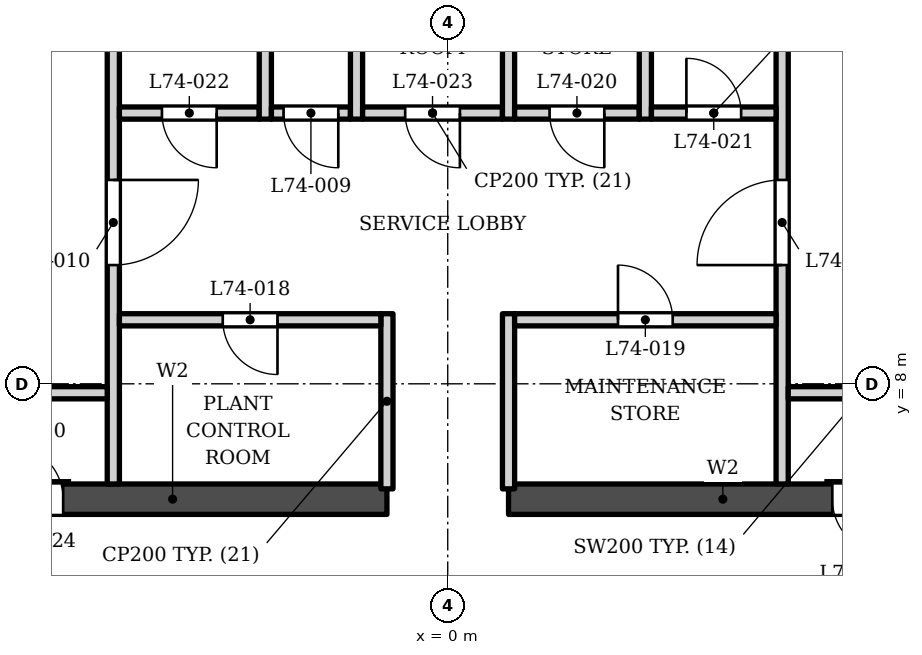
"""IFC4 building model, lengths in metres.
Left out: names, types, materials, properties, quantities, classifications, styles, units other than length and angle.
Written with IfcOpenShell. Run it as: python <this file> out.ifc"""

import sys

from ifc_helpers import new_model, si_unit, direction, frame, frame_2d, origin, place, context, subcontext, project, spatial, rectangle, extrude, element, fill, save


model = new_model("IFC4")
c1 = context("Model", 3, precision=1e-05, world=origin(), true_north=direction((0.0, 1.0)))
c2 = subcontext(c1, "Body", "Model", "MODEL_VIEW")
j1 = project(units=[si_unit("LENGTHUNIT", "METRE"), si_unit("PLANEANGLEUNIT", "RADIAN")], contexts=[c1])
p1 = place(None, origin())
s1 = spatial("IfcSite", under=j1, at=p1, CompositionType="ELEMENT")
p2 = place(p1, origin())
s2 = spatial("IfcBuilding", under=s1, at=p2, CompositionType="ELEMENT")
p3 = place(p2, frame((0.0, 0.0, 315.5)))
s3 = spatial("IfcBuildingStorey", under=s2, at=p3, CompositionType="ELEMENT", Elevation=315.5)
p4 = place(p3, frame((-8.05, 6.103, 0.0), z_axis=(0.0, 0.0, 1.0), x_axis=(1.0, 0.0, 0.0)))
e1 = element("IfcWall", 1, at=p4, inside=s3, PredefinedType="SHEAR", context=c2, shape_type="SweptSolid", body=[
    extrude(rectangle(XDim=7.05, YDim=0.5, at=frame_2d((3.525, 0.0))), origin(), (0.0, 0.0, 1.0), 5.0),
])
p5 = place(p4, frame((0.825, 0.0, 0.0)))
e2 = element("IfcOpeningElement", 2, at=p5, cuts=e1, PredefinedType="OPENING", context=c2, shape_type="SweptSolid", body=[
    extrude(rectangle(XDim=0.9, YDim=2.1, at=frame_2d((0.45, 1.05))), frame((0.0, 0.26, 0.0), z_axis=(0.0, -1.0, 0.0), x_axis=(1.0, 0.0, 0.0)), (0.0, 0.0, 1.0), 0.52),
])
p6 = place(p3, frame((1.0, 6.103, 0.0), z_axis=(0.0, 0.0, 1.0), x_axis=(1.0, 0.0, 0.0)))
e3 = element("IfcWall", 3, at=p6, inside=s3, PredefinedType="SHEAR", context=c2, shape_type="SweptSolid", body=[
    extrude(rectangle(XDim=7.05, YDim=0.5, at=frame_2d((3.525, 0.0))), origin(), (0.0, 0.0, 1.0), 5.0),
])
p7 = place(p6, frame((5.325, 0.0, 0.0)))
e4 = element("IfcOpeningElement", 4, at=p7, cuts=e3, PredefinedType="OPENING", context=c2, shape_type="SweptSolid", body=[
    extrude(rectangle(XDim=0.9, YDim=2.1, at=frame_2d((0.45, 1.05))), frame((0.0, 0.26, 0.0), z_axis=(0.0, -1.0, 0.0), x_axis=(1.0, 0.0, 0.0)), (0.0, 0.0, 1.0), 0.52),
])
for number, where, z_axis, x_axis in (
    (5, (-1.0, 6.273, 0.0), (0.0, 0.0, 1.0), (0.0, 1.0, 0.0)),
    (6, (1.0, 6.273, 0.0), (0.0, 0.0, 1.0), (0.0, 1.0, 0.0)),
):
    element("IfcWall", number, at=place(p3, frame(where, z_axis=z_axis, x_axis=x_axis)), inside=s3, PredefinedType="PARTITIONING", context=c2, shape_type="SweptSolid", body=[
        extrude(rectangle(XDim=2.88, YDim=0.2, at=frame_2d((1.44, 0.0))), origin(), (0.0, 0.0, 1.0), 4.8),
    ])
p8 = place(p3, frame((-5.5, 6.353, 0.0), z_axis=(0.0, 0.0, 1.0), x_axis=(0.0, 1.0, 0.0)))
e7 = element("IfcWall", 7, at=p8, inside=s3, PredefinedType="SOLIDWALL", context=c2, shape_type="SweptSolid", body=[
    extrude(rectangle(XDim=7.85, YDim=0.2, at=frame_2d((3.925, 0.0))), origin(), (0.0, 0.0, 1.0), 4.8),
])
p9 = place(p8, frame((3.6, 0.0, 0.0)))
e8 = element("IfcOpeningElement", 8, at=p9, cuts=e7, PredefinedType="OPENING", context=c2, shape_type="SweptSolid", body=[
    extrude(rectangle(XDim=1.4, YDim=2.1, at=frame_2d((0.7, 1.05))), frame((0.0, 0.11, 0.0), z_axis=(0.0, -1.0, 0.0), x_axis=(1.0, 0.0, 0.0)), (0.0, 0.0, 1.0), 0.22),
])
p10 = place(p3, frame((5.5, 6.353, 0.0), z_axis=(0.0, 0.0, 1.0), x_axis=(0.0, 1.0, 0.0)))
e9 = element("IfcWall", 9, at=p10, inside=s3, PredefinedType="SOLIDWALL", context=c2, shape_type="SweptSolid", body=[
    extrude(rectangle(XDim=7.85, YDim=0.2, at=frame_2d((3.925, 0.0))), origin(), (0.0, 0.0, 1.0), 4.8),
])
p11 = place(p10, frame((3.6, 0.0, 0.0)))
e10 = element("IfcOpeningElement", 10, at=p11, cuts=e9, PredefinedType="OPENING", context=c2, shape_type="SweptSolid", body=[
    extrude(rectangle(XDim=1.4, YDim=2.1, at=frame_2d((0.7, 1.05))), frame((0.0, 0.11, 0.0), z_axis=(0.0, -1.0, 0.0), x_axis=(1.0, 0.0, 0.0)), (0.0, 0.0, 1.0), 0.22),
])
for number, where, z_axis, x_axis in (
    (11, (-8.05, 7.853, 0.0), (0.0, 0.0, 1.0), (1.0, 0.0, 0.0)),
    (12, (5.6, 7.853, 0.0), (0.0, 0.0, 1.0), (1.0, 0.0, 0.0)),
):
    element("IfcWall", number, at=place(p3, frame(where, z_axis=z_axis, x_axis=x_axis)), inside=s3, PredefinedType="SOLIDWALL", context=c2, shape_type="SweptSolid", body=[
        extrude(rectangle(XDim=2.45, YDim=0.2, at=frame_2d((1.225, 0.0))), origin(), (0.0, 0.0, 1.0), 4.8),
    ])
p12 = place(p3, frame((-5.4, 9.052, 0.0), z_axis=(0.0, 0.0, 1.0), x_axis=(1.0, 0.0, 0.0)))
e13 = element("IfcWall", 13, at=p12, inside=s3, PredefinedType="PARTITIONING", context=c2, shape_type="SweptSolid", body=[
    extrude(rectangle(XDim=4.3, YDim=0.2, at=frame_2d((2.15, 0.0))), origin(), (0.0, 0.0, 1.0), 4.8),
])
p13 = place(p12, frame((1.7, 0.0, 0.0)))
e14 = element("IfcOpeningElement", 14, at=p13, cuts=e13, PredefinedType="OPENING", context=c2, shape_type="SweptSolid", body=[
    extrude(rectangle(XDim=0.9, YDim=2.1, at=frame_2d((0.45, 1.05))), frame((0.0, 0.11, 0.0), z_axis=(0.0, -1.0, 0.0), x_axis=(1.0, 0.0, 0.0)), (0.0, 0.0, 1.0), 0.22),
])
p14 = place(p3, frame((1.1, 9.052, 0.0), z_axis=(0.0, 0.0, 1.0), x_axis=(1.0, 0.0, 0.0)))
e15 = element("IfcWall", 15, at=p14, inside=s3, PredefinedType="PARTITIONING", context=c2, shape_type="SweptSolid", body=[
    extrude(rectangle(XDim=4.3, YDim=0.2, at=frame_2d((2.15, 0.0))), origin(), (0.0, 0.0, 1.0), 4.8),
])
p15 = place(p14, frame((1.7, 0.0, 0.0)))
e16 = element("IfcOpeningElement", 16, at=p15, cuts=e15, PredefinedType="OPENING", context=c2, shape_type="SweptSolid", body=[
    extrude(rectangle(XDim=0.9, YDim=2.1, at=frame_2d((0.45, 1.05))), frame((0.0, 0.11, 0.0), z_axis=(0.0, -1.0, 0.0), x_axis=(1.0, 0.0, 0.0)), (0.0, 0.0, 1.0), 0.22),
])
p16 = place(p3, frame((-5.4, 12.453, 0.0), z_axis=(0.0, 0.0, 1.0), x_axis=(1.0, 0.0, 0.0)))
e17 = element("IfcWall", 17, at=p16, inside=s3, PredefinedType="PARTITIONING", context=c2, shape_type="SweptSolid", body=[
    extrude(rectangle(XDim=2.3, YDim=0.2, at=frame_2d((1.15, 0.0))), origin(), (0.0, 0.0, 1.0), 4.8),
])
p17 = place(p16, frame((0.7, 0.0, 0.0)))
e18 = element("IfcOpeningElement", 18, at=p17, cuts=e17, PredefinedType="OPENING", context=c2, shape_type="SweptSolid", body=[
    extrude(rectangle(XDim=0.9, YDim=2.1, at=frame_2d((0.45, 1.05))), frame((0.0, 0.11, 0.0), z_axis=(0.0, -1.0, 0.0), x_axis=(1.0, 0.0, 0.0)), (0.0, 0.0, 1.0), 0.22),
])
p18 = place(p3, frame((-3.0, 12.353, 0.0), z_axis=(0.0, 0.0, 1.0), x_axis=(0.0, 1.0, 0.0)))
e19 = element("IfcWall", 19, at=p18, inside=s3, PredefinedType="PARTITIONING", context=c2, shape_type="SweptSolid", body=[
    extrude(rectangle(XDim=3.2, YDim=0.2, at=frame_2d((1.6, 0.0))), origin(), (0.0, 0.0, 1.0), 4.8),
])
p19 = place(p3, frame((-2.9, 12.453, 0.0), z_axis=(0.0, 0.0, 1.0), x_axis=(1.0, 0.0, 0.0)))
e20 = element("IfcWall", 20, at=p19, inside=s3, PredefinedType="PARTITIONING", context=c2, shape_type="SweptSolid", body=[
    extrude(rectangle(XDim=1.3, YDim=0.2, at=frame_2d((0.65, 0.0))), origin(), (0.0, 0.0, 1.0), 4.8),
])
p20 = place(p19, frame((0.2, 0.0, 0.0)))
e21 = element("IfcOpeningElement", 21, at=p20, cuts=e20, PredefinedType="OPENING", context=c2, shape_type="SweptSolid", body=[
    extrude(rectangle(XDim=0.9, YDim=2.1, at=frame_2d((0.45, 1.05))), frame((0.0, 0.11, 0.0), z_axis=(0.0, -1.0, 0.0), x_axis=(1.0, 0.0, 0.0)), (0.0, 0.0, 1.0), 0.22),
])
p21 = place(p3, frame((-1.5, 12.353, 0.0), z_axis=(0.0, 0.0, 1.0), x_axis=(0.0, 1.0, 0.0)))
e22 = element("IfcWall", 22, at=p21, inside=s3, PredefinedType="PARTITIONING", context=c2, shape_type="SweptSolid", body=[
    extrude(rectangle(XDim=3.2, YDim=0.2, at=frame_2d((1.6, 0.0))), origin(), (0.0, 0.0, 1.0), 4.8),
])
p22 = place(p3, frame((-1.4, 12.453, 0.0), z_axis=(0.0, 0.0, 1.0), x_axis=(1.0, 0.0, 0.0)))
e23 = element("IfcWall", 23, at=p22, inside=s3, PredefinedType="PARTITIONING", context=c2, shape_type="SweptSolid", body=[
    extrude(rectangle(XDim=2.3, YDim=0.2, at=frame_2d((1.15, 0.0))), origin(), (0.0, 0.0, 1.0), 4.8),
])
p23 = place(p22, frame((0.7, 0.0, 0.0)))
e24 = element("IfcOpeningElement", 24, at=p23, cuts=e23, PredefinedType="OPENING", context=c2, shape_type="SweptSolid", body=[
    extrude(rectangle(XDim=0.9, YDim=2.1, at=frame_2d((0.45, 1.05))), frame((0.0, 0.11, 0.0), z_axis=(0.0, -1.0, 0.0), x_axis=(1.0, 0.0, 0.0)), (0.0, 0.0, 1.0), 0.22),
])
p24 = place(p3, frame((1.0, 12.353, 0.0), z_axis=(0.0, 0.0, 1.0), x_axis=(0.0, 1.0, 0.0)))
e25 = element("IfcWall", 25, at=p24, inside=s3, PredefinedType="PARTITIONING", context=c2, shape_type="SweptSolid", body=[
    extrude(rectangle(XDim=3.2, YDim=0.2, at=frame_2d((1.6, 0.0))), origin(), (0.0, 0.0, 1.0), 4.8),
])
p25 = place(p3, frame((1.1, 12.453, 0.0), z_axis=(0.0, 0.0, 1.0), x_axis=(1.0, 0.0, 0.0)))
e26 = element("IfcWall", 26, at=p25, inside=s3, PredefinedType="PARTITIONING", context=c2, shape_type="SweptSolid", body=[
    extrude(rectangle(XDim=2.05, YDim=0.2, at=frame_2d((1.025, 0.0))), origin(), (0.0, 0.0, 1.0), 4.8),
])
p26 = place(p25, frame((0.575, 0.0, 0.0)))
e27 = element("IfcOpeningElement", 27, at=p26, cuts=e26, PredefinedType="OPENING", context=c2, shape_type="SweptSolid", body=[
    extrude(rectangle(XDim=0.9, YDim=2.1, at=frame_2d((0.45, 1.05))), frame((0.0, 0.11, 0.0), z_axis=(0.0, -1.0, 0.0), x_axis=(1.0, 0.0, 0.0)), (0.0, 0.0, 1.0), 0.22),
])
p27 = place(p3, frame((3.25, 12.353, 0.0), z_axis=(0.0, 0.0, 1.0), x_axis=(0.0, 1.0, 0.0)))
e28 = element("IfcWall", 28, at=p27, inside=s3, PredefinedType="PARTITIONING", context=c2, shape_type="SweptSolid", body=[
    extrude(rectangle(XDim=3.2, YDim=0.2, at=frame_2d((1.6, 0.0))), origin(), (0.0, 0.0, 1.0), 4.8),
])
p28 = place(p3, frame((3.35, 12.453, 0.0), z_axis=(0.0, 0.0, 1.0), x_axis=(1.0, 0.0, 0.0)))
e29 = element("IfcWall", 29, at=p28, inside=s3, PredefinedType="PARTITIONING", context=c2, shape_type="SweptSolid", body=[
    extrude(rectangle(XDim=2.05, YDim=0.2, at=frame_2d((1.025, 0.0))), origin(), (0.0, 0.0, 1.0), 4.8),
])
p29 = place(p28, frame((0.575, 0.0, 0.0)))
e30 = element("IfcOpeningElement", 30, at=p29, cuts=e29, PredefinedType="OPENING", context=c2, shape_type="SweptSolid", body=[
    extrude(rectangle(XDim=0.9, YDim=2.1, at=frame_2d((0.45, 1.05))), frame((0.0, 0.11, 0.0), z_axis=(0.0, -1.0, 0.0), x_axis=(1.0, 0.0, 0.0)), (0.0, 0.0, 1.0), 0.22),
])
p30 = place(p20, origin())
e31 = element("IfcDoor", 31, at=p30, inside=s3, OperationType="SINGLE_SWING_RIGHT", PredefinedType="DOOR", context=c2, shape_type="SweptSolid", body=[
    extrude(rectangle(XDim=0.9, YDim=2.1, at=frame_2d((0.45, 1.05))), frame((0.0, 0.025, 0.0), z_axis=(0.0, -1.0, 0.0), x_axis=(1.0, 0.0, 0.0)), (0.0, 0.0, 1.0), 0.05),
])
fill(e21, e31)
p31 = place(p9, origin())
e32 = element("IfcDoor", 32, at=p31, inside=s3, OperationType="SINGLE_SWING_RIGHT", PredefinedType="DOOR", context=c2, shape_type="SweptSolid", body=[
    extrude(rectangle(XDim=1.4, YDim=2.1, at=frame_2d((0.7, 1.05))), frame((0.0, 0.025, 0.0), z_axis=(0.0, -1.0, 0.0), x_axis=(1.0, 0.0, 0.0)), (0.0, 0.0, 1.0), 0.05),
])
fill(e8, e32)
p32 = place(p11, origin())
e33 = element("IfcDoor", 33, at=p32, inside=s3, OperationType="SINGLE_SWING_LEFT", PredefinedType="DOOR", context=c2, shape_type="SweptSolid", body=[
    extrude(rectangle(XDim=1.4, YDim=2.1, at=frame_2d((0.7, 1.05))), frame((0.0, 0.025, 0.0), z_axis=(0.0, -1.0, 0.0), x_axis=(1.0, 0.0, 0.0)), (0.0, 0.0, 1.0), 0.05),
])
fill(e10, e33)
p33 = place(p13, origin())
e34 = element("IfcDoor", 34, at=p33, inside=s3, OperationType="SINGLE_SWING_RIGHT", PredefinedType="DOOR", context=c2, shape_type="SweptSolid", body=[
    extrude(rectangle(XDim=0.9, YDim=2.1, at=frame_2d((0.45, 1.05))), frame((0.0, 0.025, 0.0), z_axis=(0.0, -1.0, 0.0), x_axis=(1.0, 0.0, 0.0)), (0.0, 0.0, 1.0), 0.05),
])
fill(e14, e34)
p34 = place(p15, origin())
e35 = element("IfcDoor", 35, at=p34, inside=s3, OperationType="SINGLE_SWING_LEFT", PredefinedType="DOOR", context=c2, shape_type="SweptSolid", body=[
    extrude(rectangle(XDim=0.9, YDim=2.1, at=frame_2d((0.45, 1.05))), frame((0.0, 0.025, 0.0), z_axis=(0.0, -1.0, 0.0), x_axis=(1.0, 0.0, 0.0)), (0.0, 0.0, 1.0), 0.05),
])
fill(e16, e35)
p35 = place(p26, origin())
e36 = element("IfcDoor", 36, at=p35, inside=s3, OperationType="SINGLE_SWING_RIGHT", PredefinedType="DOOR", context=c2, shape_type="SweptSolid", body=[
    extrude(rectangle(XDim=0.9, YDim=2.1, at=frame_2d((0.45, 1.05))), frame((0.0, 0.025, 0.0), z_axis=(0.0, -1.0, 0.0), x_axis=(1.0, 0.0, 0.0)), (0.0, 0.0, 1.0), 0.05),
])
fill(e27, e36)
p36 = place(p29, origin())
e37 = element("IfcDoor", 37, at=p36, inside=s3, OperationType="SINGLE_SWING_LEFT", PredefinedType="DOOR", context=c2, shape_type="SweptSolid", body=[
    extrude(rectangle(XDim=0.9, YDim=2.1, at=frame_2d((0.45, 1.05))), frame((0.0, 0.025, 0.0), z_axis=(0.0, -1.0, 0.0), x_axis=(1.0, 0.0, 0.0)), (0.0, 0.0, 1.0), 0.05),
])
fill(e30, e37)
p37 = place(p17, origin())
e38 = element("IfcDoor", 38, at=p37, inside=s3, OperationType="SINGLE_SWING_RIGHT", PredefinedType="DOOR", context=c2, shape_type="SweptSolid", body=[
    extrude(rectangle(XDim=0.9, YDim=2.1, at=frame_2d((0.45, 1.05))), frame((0.0, 0.025, 0.0), z_axis=(0.0, -1.0, 0.0), x_axis=(1.0, 0.0, 0.0)), (0.0, 0.0, 1.0), 0.05),
])
fill(e18, e38)
p38 = place(p23, origin())
e39 = element("IfcDoor", 39, at=p38, inside=s3, OperationType="SINGLE_SWING_RIGHT", PredefinedType="DOOR", context=c2, shape_type="SweptSolid", body=[
    extrude(rectangle(XDim=0.9, YDim=2.1, at=frame_2d((0.45, 1.05))), frame((0.0, 0.025, 0.0), z_axis=(0.0, -1.0, 0.0), x_axis=(1.0, 0.0, 0.0)), (0.0, 0.0, 1.0), 0.05),
])
fill(e24, e39)
p39 = place(p5, origin())
e40 = element("IfcDoor", 40, at=p39, inside=s3, OperationType="SINGLE_SWING_LEFT", PredefinedType="DOOR", context=c2, shape_type="SweptSolid", body=[
    extrude(rectangle(XDim=0.9, YDim=2.1, at=frame_2d((0.45, 1.05))), frame((0.0, 0.025, 0.0), z_axis=(0.0, -1.0, 0.0), x_axis=(1.0, 0.0, 0.0)), (0.0, 0.0, 1.0), 0.05),
])
fill(e2, e40)
p40 = place(p7, origin())
e41 = element("IfcDoor", 41, at=p40, inside=s3, OperationType="SINGLE_SWING_RIGHT", PredefinedType="DOOR", context=c2, shape_type="SweptSolid", body=[
    extrude(rectangle(XDim=0.9, YDim=2.1, at=frame_2d((0.45, 1.05))), frame((0.0, 0.025, 0.0), z_axis=(0.0, -1.0, 0.0), x_axis=(1.0, 0.0, 0.0)), (0.0, 0.0, 1.0), 0.05),
])
fill(e4, e41)
save(model, sys.argv[1])
